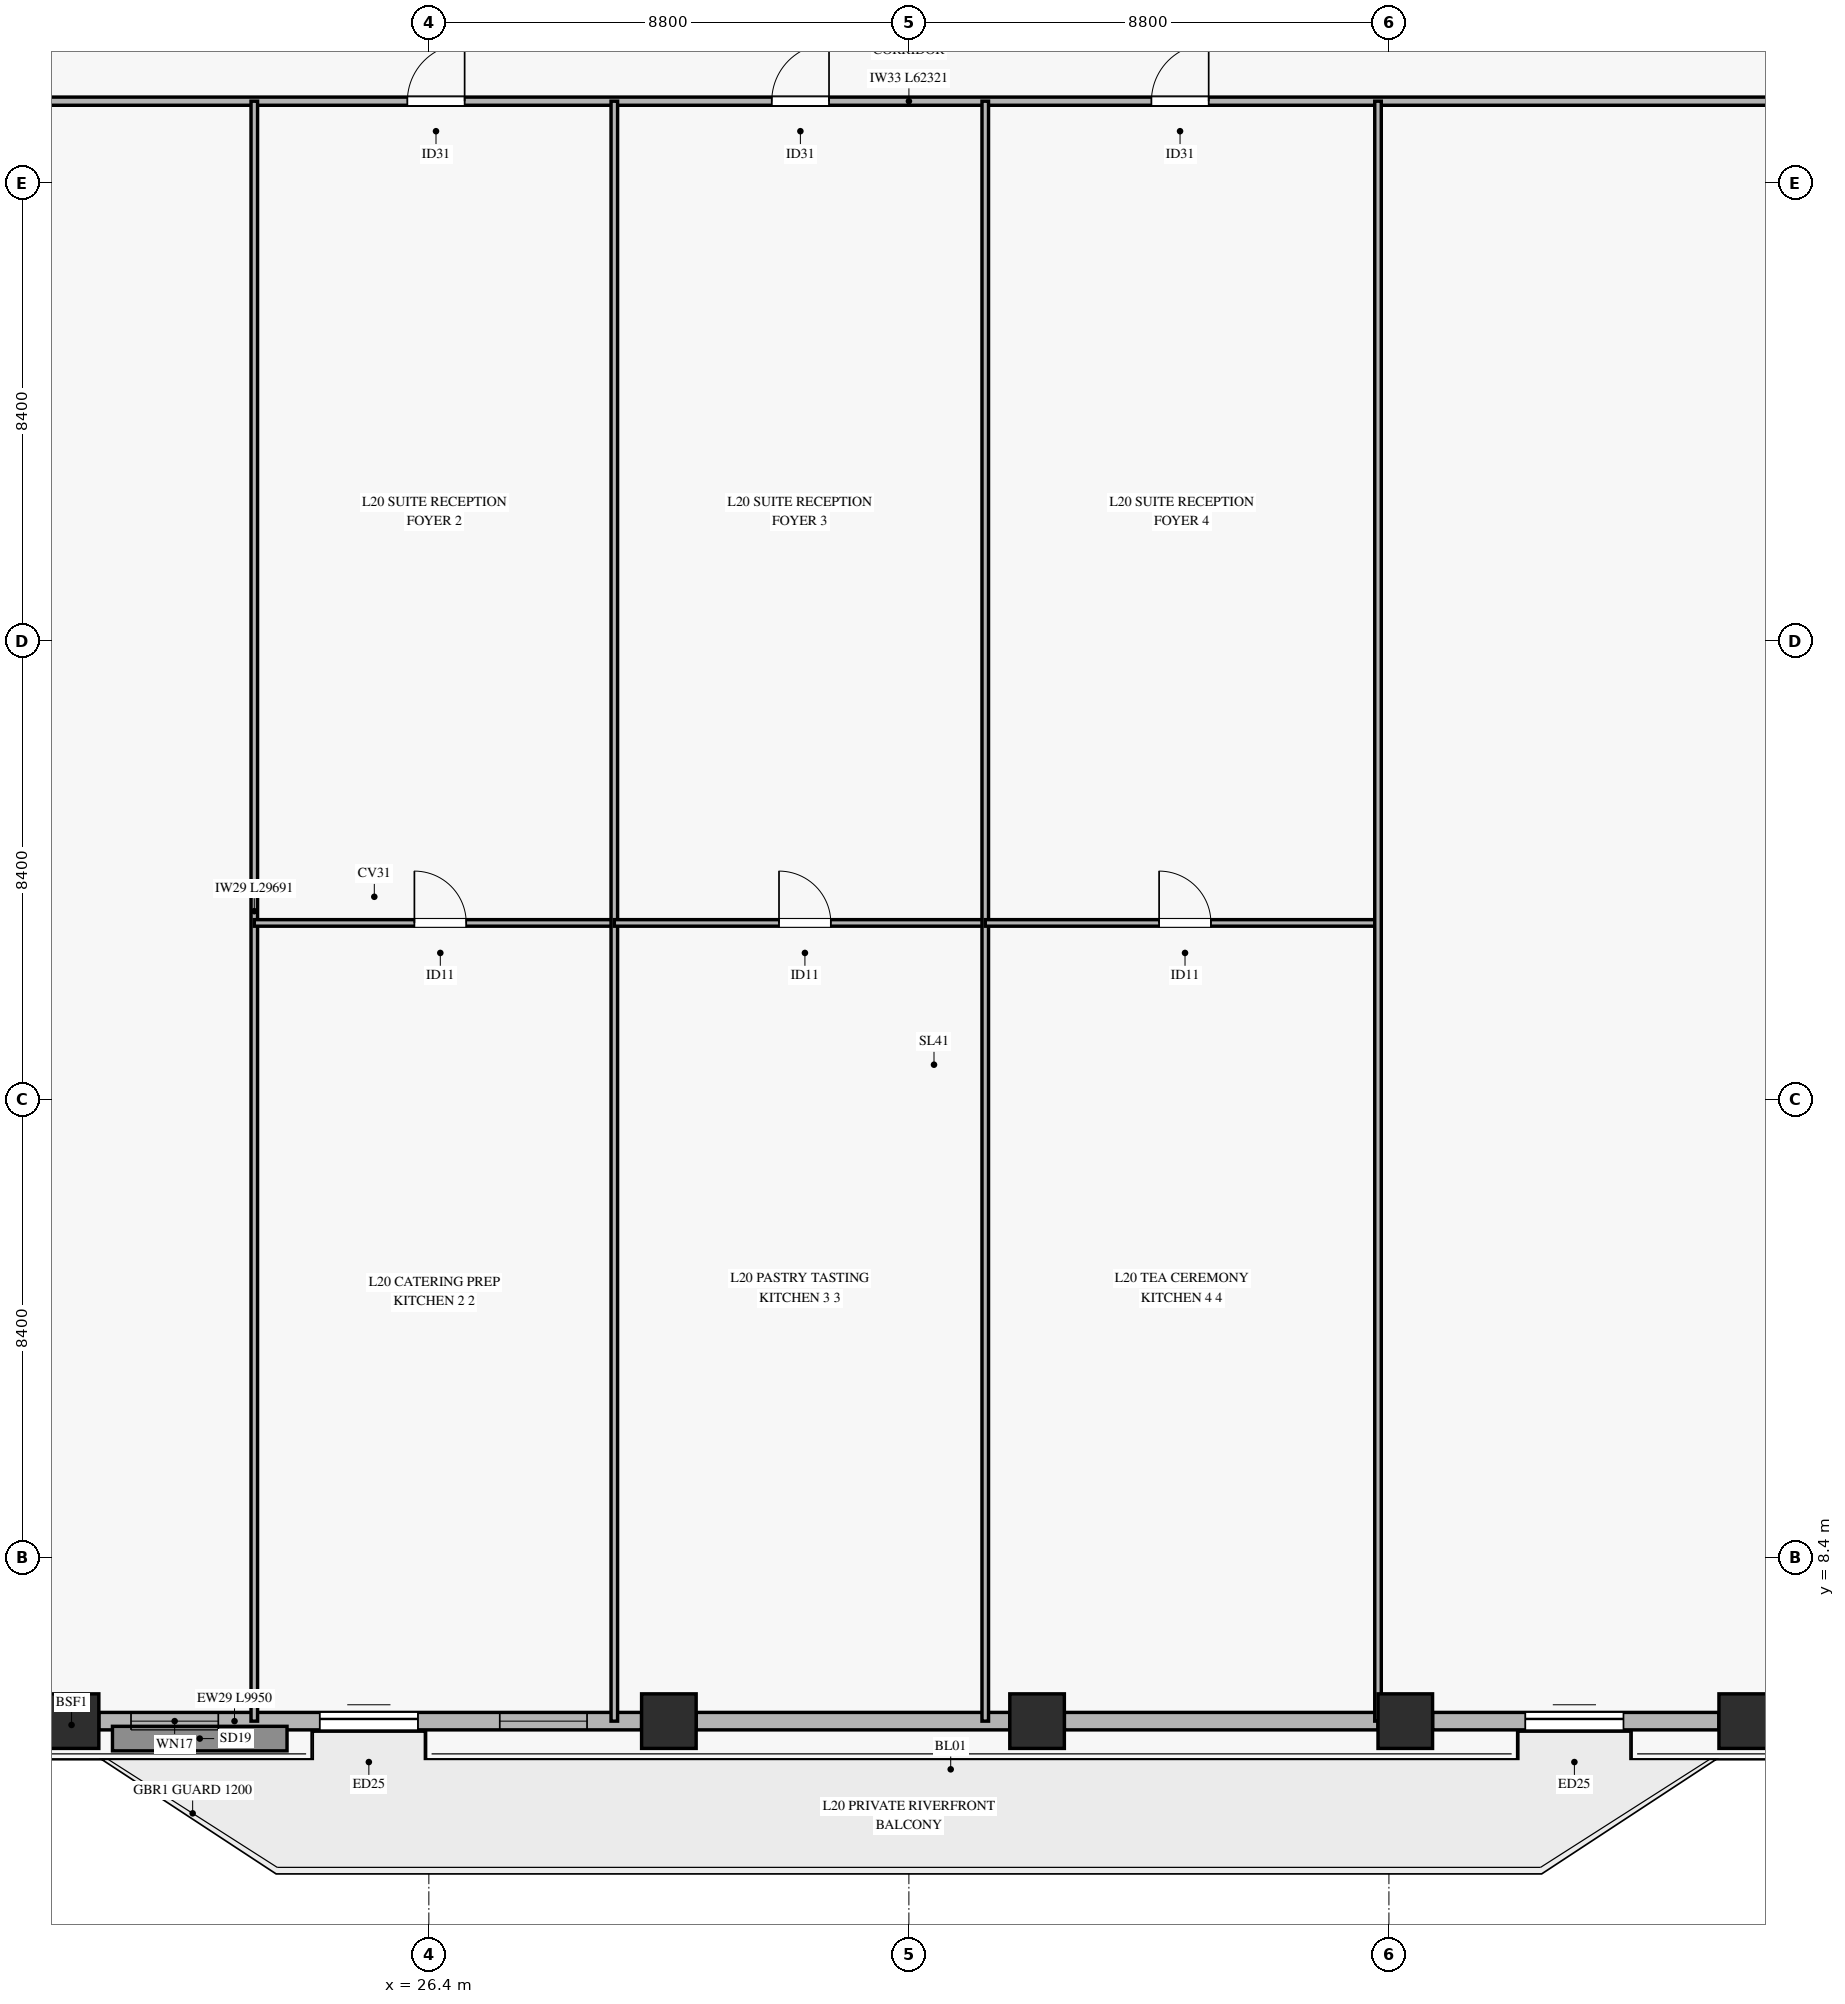
"""IFC4 building model, lengths in metres.
Left out: names, types, materials, properties, quantities, classifications, styles, units other than length and angle.
Written with IfcOpenShell. Run it as: python <this file> out.ifc"""

import sys

from ifc_helpers import new_model, si_unit, direction, frame, frame_2d, origin, origin_2d, place, context, subcontext, project, spatial, rectangle, hollow_rectangle, extrude, source, transform, mapped, element, fill, save


model = new_model("IFC4")
c1 = context("Model", 3, precision=1e-05, world=origin(), true_north=direction((0.0, 1.0)))
c2 = subcontext(c1, "Body", "Model", "MODEL_VIEW")
j1 = project(units=[si_unit("LENGTHUNIT", "METRE"), si_unit("PLANEANGLEUNIT", "RADIAN")], contexts=[c1])
p1 = place(None, origin())
s1 = spatial("IfcSite", under=j1, at=p1, CompositionType="ELEMENT")
p2 = place(p1, origin())
s2 = spatial("IfcBuilding", under=s1, at=p2, CompositionType="ELEMENT")
p3 = place(p2, frame((0.0, 0.0, 83.5)))
s3 = spatial("IfcBuildingStorey", under=s2, at=p3, CompositionType="ELEMENT", Elevation=83.5)
m1 = source(origin(), c2, "Body", "SweptSolid", [
    extrude(hollow_rectangle(XDim=1.0, YDim=1.0, WallThickness=0.045, at=origin_2d()), origin(), (0.0, 0.0, 1.0), 3.718),
])
for number, where, z_axis, x_axis in (
    (1, (19.85, 5.409, 0.0), (0.0, 0.142, 0.99), (-1.0, 0.0, 0.0)),
    (2, (30.8, 5.409, 0.0), (0.0, 0.142, 0.99), (-1.0, 0.0, 0.0)),
    (3, (37.55, 5.409, 0.0), (0.0, 0.142, 0.99), (-1.0, 0.0, 0.0)),
    (4, (44.3, 5.409, 0.0), (0.0, 0.142, 0.99), (-1.0, 0.0, 0.0)),
    (5, (50.55, 5.409, 0.0), (0.0, 0.142, 0.99), (-1.0, 0.0, 0.0)),
):
    element("IfcColumn", number, at=place(p3, frame(where, z_axis=z_axis, x_axis=x_axis)), inside=s3, PredefinedType="COLUMN", context=c2, shape_type="MappedRepresentation", body=[
        mapped(m1, transform((0.0, 0.0, 0.0), x_axis=(1.0, 0.0, 0.0), y_axis=(0.0, 1.0, 0.0), z_axis=(0.0, 0.0, 1.0), scale=1.0)),
    ])
p4 = place(p3, frame((20.35, 5.409, 0.0), z_axis=(0.0, 0.0, 1.0), x_axis=(1.0, 0.0, 0.0)))
e6 = element("IfcWall", 6, at=p4, inside=s3, PredefinedType="SOLIDWALL", context=c2, shape_type="SweptSolid", body=[
    extrude(rectangle(XDim=9.95, YDim=0.32, at=frame_2d((4.975, 0.0))), origin(), (0.0, 0.0, 1.0), 3.16),
])
p5 = place(p4, frame((4.05, 0.0, 0.0)))
e7 = element("IfcOpeningElement", 7, at=p5, cuts=e6, PredefinedType="OPENING", context=c2, shape_type="SweptSolid", body=[
    extrude(rectangle(XDim=1.8, YDim=2.25, at=frame_2d((0.9, 1.125))), frame((0.0, 0.17, 0.0), z_axis=(0.0, -1.0, 0.0), x_axis=(1.0, 0.0, 0.0)), (0.0, 0.0, 1.0), 0.34),
])
p6 = place(p4, frame((0.59, 0.0, 0.45)))
e8 = element("IfcOpeningElement", 8, at=p6, cuts=e6, PredefinedType="OPENING", context=c2, shape_type="SweptSolid", body=[
    extrude(rectangle(XDim=1.6, YDim=2.0, at=frame_2d((0.8, 1.0))), frame((0.0, 0.17, 0.0), z_axis=(0.0, -1.0, 0.0), x_axis=(1.0, 0.0, 0.0)), (0.0, 0.0, 1.0), 0.34),
])
p7 = place(p4, frame((7.35, 0.0, 0.45)))
e9 = element("IfcOpeningElement", 9, at=p7, cuts=e6, PredefinedType="OPENING", context=c2, shape_type="SweptSolid", body=[
    extrude(rectangle(XDim=1.6, YDim=2.0, at=frame_2d((0.8, 1.0))), frame((0.0, 0.17, 0.0), z_axis=(0.0, -1.0, 0.0), x_axis=(1.0, 0.0, 0.0)), (0.0, 0.0, 1.0), 0.34),
])
for number, where, z_axis, x_axis in (
    (10, (31.3, 5.409, 0.0), (0.0, 0.0, 1.0), (1.0, 0.0, 0.0)),
    (11, (38.05, 5.409, 0.0), (0.0, 0.0, 1.0), (1.0, 0.0, 0.0)),
):
    element("IfcWall", number, at=place(p3, frame(where, z_axis=z_axis, x_axis=x_axis)), inside=s3, PredefinedType="SOLIDWALL", context=c2, shape_type="SweptSolid", body=[
        extrude(rectangle(XDim=5.75, YDim=0.32, at=frame_2d((2.875, 0.0))), origin(), (0.0, 0.0, 1.0), 3.16),
    ])
p8 = place(p3, frame((44.8, 5.409, 0.0), z_axis=(0.0, 0.0, 1.0), x_axis=(1.0, 0.0, 0.0)))
e12 = element("IfcWall", 12, at=p8, inside=s3, PredefinedType="SOLIDWALL", context=c2, shape_type="SweptSolid", body=[
    extrude(rectangle(XDim=5.25, YDim=0.32, at=frame_2d((2.625, 0.0))), origin(), (0.0, 0.0, 1.0), 3.16),
])
p9 = place(p8, frame((1.7, 0.0, 0.0)))
e13 = element("IfcOpeningElement", 13, at=p9, cuts=e12, PredefinedType="OPENING", context=c2, shape_type="SweptSolid", body=[
    extrude(rectangle(XDim=1.8, YDim=2.25, at=frame_2d((0.9, 1.125))), frame((0.0, 0.17, 0.0), z_axis=(0.0, -1.0, 0.0), x_axis=(1.0, 0.0, 0.0)), (0.0, 0.0, 1.0), 0.34),
])
p10 = place(p3, frame((4.04, 35.1, 0.0), z_axis=(0.0, 0.0, 1.0), x_axis=(1.0, 0.0, 0.0)))
e14 = element("IfcWall", 14, at=p10, inside=s3, PredefinedType="PARTITIONING", context=c2, shape_type="SweptSolid", body=[
    extrude(rectangle(XDim=62.321, YDim=0.15, at=frame_2d((31.161, 0.0))), origin(), (0.0, 0.0, 1.0), 2.765),
])
p11 = place(p10, frame((8.462, 0.0, 0.0)))
e15 = element("IfcOpeningElement", 15, at=p11, cuts=e14, PredefinedType="OPENING", context=c2, shape_type="SweptSolid", body=[
    extrude(rectangle(XDim=1.05, YDim=2.15, at=frame_2d((0.525, 1.075))), frame((0.0, 0.085, 0.0), z_axis=(0.0, -1.0, 0.0), x_axis=(1.0, 0.0, 0.0)), (0.0, 0.0, 1.0), 0.17),
])
p12 = place(p10, frame((21.966, 0.0, 0.0)))
e16 = element("IfcOpeningElement", 16, at=p12, cuts=e14, PredefinedType="OPENING", context=c2, shape_type="SweptSolid", body=[
    extrude(rectangle(XDim=1.05, YDim=2.15, at=frame_2d((0.525, 1.075))), frame((0.0, 0.085, 0.0), z_axis=(0.0, -1.0, 0.0), x_axis=(1.0, 0.0, 0.0)), (0.0, 0.0, 1.0), 0.17),
])
p13 = place(p10, frame((28.646, 0.0, 0.0)))
e17 = element("IfcOpeningElement", 17, at=p13, cuts=e14, PredefinedType="OPENING", context=c2, shape_type="SweptSolid", body=[
    extrude(rectangle(XDim=1.05, YDim=2.15, at=frame_2d((0.525, 1.075))), frame((0.0, 0.085, 0.0), z_axis=(0.0, -1.0, 0.0), x_axis=(1.0, 0.0, 0.0)), (0.0, 0.0, 1.0), 0.17),
])
p14 = place(p10, frame((35.606, 0.0, 0.0)))
e18 = element("IfcOpeningElement", 18, at=p14, cuts=e14, PredefinedType="OPENING", context=c2, shape_type="SweptSolid", body=[
    extrude(rectangle(XDim=1.05, YDim=2.15, at=frame_2d((0.525, 1.075))), frame((0.0, 0.085, 0.0), z_axis=(0.0, -1.0, 0.0), x_axis=(1.0, 0.0, 0.0)), (0.0, 0.0, 1.0), 0.17),
])
p15 = place(p10, frame((49.216, 0.0, 0.0)))
e19 = element("IfcOpeningElement", 19, at=p15, cuts=e14, PredefinedType="OPENING", context=c2, shape_type="SweptSolid", body=[
    extrude(rectangle(XDim=1.05, YDim=2.15, at=frame_2d((0.525, 1.075))), frame((0.0, 0.085, 0.0), z_axis=(0.0, -1.0, 0.0), x_axis=(1.0, 0.0, 0.0)), (0.0, 0.0, 1.0), 0.17),
])
p16 = place(p3, frame((23.2, 5.409, 0.0), z_axis=(0.0, 0.0, 1.0), x_axis=(0.0, 1.0, 0.0)))
e20 = element("IfcWall", 20, at=p16, inside=s3, PredefinedType="PARTITIONING", context=c2, shape_type="SweptSolid", body=[
    extrude(rectangle(XDim=29.691, YDim=0.12, at=frame_2d((14.846, 0.0))), origin(), (0.0, 0.0, 1.0), 3.165),
])
p17 = place(p3, frame((23.2, 20.039, 0.0), z_axis=(0.0, 0.0, 1.0), x_axis=(1.0, 0.0, 0.0)))
e21 = element("IfcWall", 21, at=p17, inside=s3, PredefinedType="PARTITIONING", context=c2, shape_type="SweptSolid", body=[
    extrude(rectangle(XDim=6.6, YDim=0.12, at=frame_2d((3.3, 0.0))), origin(), (0.0, 0.0, 1.0), 3.68),
])
p18 = place(p17, frame((2.935, 0.0, 0.0)))
e22 = element("IfcOpeningElement", 22, at=p18, cuts=e21, PredefinedType="OPENING", context=c2, shape_type="SweptSolid", body=[
    extrude(rectangle(XDim=0.95, YDim=2.1, at=frame_2d((0.475, 1.05))), frame((0.0, 0.07, 0.0), z_axis=(0.0, -1.0, 0.0), x_axis=(1.0, 0.0, 0.0)), (0.0, 0.0, 1.0), 0.14),
])
p19 = place(p3, frame((29.8, 5.409, 0.0), z_axis=(0.0, 0.0, 1.0), x_axis=(0.0, 1.0, 0.0)))
e23 = element("IfcWall", 23, at=p19, inside=s3, PredefinedType="PARTITIONING", context=c2, shape_type="SweptSolid", body=[
    extrude(rectangle(XDim=29.691, YDim=0.12, at=frame_2d((14.846, 0.0))), origin(), (0.0, 0.0, 1.0), 3.165),
])
p20 = place(p3, frame((29.8, 20.039, 0.0), z_axis=(0.0, 0.0, 1.0), x_axis=(1.0, 0.0, 0.0)))
e24 = element("IfcWall", 24, at=p20, inside=s3, PredefinedType="PARTITIONING", context=c2, shape_type="SweptSolid", body=[
    extrude(rectangle(XDim=6.8, YDim=0.12, at=frame_2d((3.4, 0.0))), origin(), (0.0, 0.0, 1.0), 2.765),
])
p21 = place(p20, frame((3.019, 0.0, 0.0)))
e25 = element("IfcOpeningElement", 25, at=p21, cuts=e24, PredefinedType="OPENING", context=c2, shape_type="SweptSolid", body=[
    extrude(rectangle(XDim=0.95, YDim=2.1, at=frame_2d((0.475, 1.05))), frame((0.0, 0.07, 0.0), z_axis=(0.0, -1.0, 0.0), x_axis=(1.0, 0.0, 0.0)), (0.0, 0.0, 1.0), 0.14),
])
p22 = place(p3, frame((36.6, 5.409, 0.0), z_axis=(0.0, 0.0, 1.0), x_axis=(0.0, 1.0, 0.0)))
e26 = element("IfcWall", 26, at=p22, inside=s3, PredefinedType="PARTITIONING", context=c2, shape_type="SweptSolid", body=[
    extrude(rectangle(XDim=29.691, YDim=0.12, at=frame_2d((14.846, 0.0))), origin(), (0.0, 0.0, 1.0), 3.165),
])
p23 = place(p3, frame((36.6, 20.039, 0.0), z_axis=(0.0, 0.0, 1.0), x_axis=(1.0, 0.0, 0.0)))
e27 = element("IfcWall", 27, at=p23, inside=s3, PredefinedType="PARTITIONING", context=c2, shape_type="SweptSolid", body=[
    extrude(rectangle(XDim=7.2, YDim=0.12, at=frame_2d((3.6, 0.0))), origin(), (0.0, 0.0, 1.0), 2.765),
])
p24 = place(p23, frame((3.187, 0.0, 0.0)))
e28 = element("IfcOpeningElement", 28, at=p24, cuts=e27, PredefinedType="OPENING", context=c2, shape_type="SweptSolid", body=[
    extrude(rectangle(XDim=0.95, YDim=2.1, at=frame_2d((0.475, 1.05))), frame((0.0, 0.07, 0.0), z_axis=(0.0, -1.0, 0.0), x_axis=(1.0, 0.0, 0.0)), (0.0, 0.0, 1.0), 0.14),
])
p25 = place(p3, frame((43.8, 5.409, 0.0), z_axis=(0.0, 0.0, 1.0), x_axis=(0.0, 1.0, 0.0)))
e29 = element("IfcWall", 29, at=p25, inside=s3, PredefinedType="PARTITIONING", context=c2, shape_type="SweptSolid", body=[
    extrude(rectangle(XDim=29.691, YDim=0.12, at=frame_2d((14.846, 0.0))), origin(), (0.0, 0.0, 1.0), 3.165),
])
m2 = source(origin(), c2, "Body", "SweptSolid", [
    extrude(rectangle(XDim=1.8, YDim=2.25, at=frame_2d((0.9, 1.125))), frame((0.0, 0.025, 0.0), z_axis=(0.0, -1.0, 0.0), x_axis=(1.0, 0.0, 0.0)), (0.0, 0.0, 1.0), 0.05),
])
p26 = place(p5, origin())
e30 = element("IfcDoor", 30, at=p26, inside=s3, OperationType="SLIDING_TO_LEFT", PredefinedType="DOOR", context=c2, shape_type="MappedRepresentation", body=[
    mapped(m2, transform((0.0, 0.0, 0.0), x_axis=(1.0, 0.0, 0.0), y_axis=(0.0, 1.0, 0.0), z_axis=(0.0, 0.0, 1.0), scale=1.0)),
])
fill(e7, e30)
m3 = source(origin(), c2, "Body", "SweptSolid", [
    extrude(rectangle(XDim=1.6, YDim=2.0, at=frame_2d((0.8, 1.0))), frame((0.0, 0.03, 0.0), z_axis=(0.0, -1.0, 0.0), x_axis=(1.0, 0.0, 0.0)), (0.0, 0.0, 1.0), 0.06),
])
p27 = place(p6, origin())
e31 = element("IfcWindow", 31, at=p27, inside=s3, PartitioningType="SINGLE_PANEL", PredefinedType="WINDOW", context=c2, shape_type="MappedRepresentation", body=[
    mapped(m3, transform((0.0, 0.0, 0.0), x_axis=(1.0, 0.0, 0.0), y_axis=(0.0, 1.0, 0.0), z_axis=(0.0, 0.0, 1.0), scale=1.0)),
])
fill(e8, e31)
p28 = place(p7, origin())
e32 = element("IfcWindow", 32, at=p28, inside=s3, PartitioningType="SINGLE_PANEL", PredefinedType="WINDOW", context=c2, shape_type="MappedRepresentation", body=[
    mapped(m3, transform((0.0, 0.0, 0.0), x_axis=(1.0, 0.0, 0.0), y_axis=(0.0, 1.0, 0.0), z_axis=(0.0, 0.0, 1.0), scale=1.0)),
])
fill(e9, e32)
p29 = place(p9, origin())
e33 = element("IfcDoor", 33, at=p29, inside=s3, OperationType="SLIDING_TO_LEFT", PredefinedType="DOOR", context=c2, shape_type="MappedRepresentation", body=[
    mapped(m2, transform((0.0, 0.0, 0.0), x_axis=(1.0, 0.0, 0.0), y_axis=(0.0, 1.0, 0.0), z_axis=(0.0, 0.0, 1.0), scale=1.0)),
])
fill(e13, e33)
m4 = source(origin(), c2, "Body", "SweptSolid", [
    extrude(rectangle(XDim=1.05, YDim=2.15, at=frame_2d((0.525, 1.075))), frame((0.0, 0.025, 0.0), z_axis=(0.0, -1.0, 0.0), x_axis=(1.0, 0.0, 0.0)), (0.0, 0.0, 1.0), 0.05),
])
p30 = place(p12, origin())
e34 = element("IfcDoor", 34, at=p30, inside=s3, OperationType="SINGLE_SWING_RIGHT", PredefinedType="DOOR", context=c2, shape_type="MappedRepresentation", body=[
    mapped(m4, transform((0.0, 0.0, 0.0), x_axis=(1.0, 0.0, 0.0), y_axis=(0.0, 1.0, 0.0), z_axis=(0.0, 0.0, 1.0), scale=1.0)),
])
fill(e16, e34)
m5 = source(origin(), c2, "Body", "SweptSolid", [
    extrude(rectangle(XDim=0.95, YDim=2.1, at=frame_2d((0.475, 1.05))), frame((0.0, 0.025, 0.0), z_axis=(0.0, -1.0, 0.0), x_axis=(1.0, 0.0, 0.0)), (0.0, 0.0, 1.0), 0.05),
])
p31 = place(p18, origin())
e35 = element("IfcDoor", 35, at=p31, inside=s3, OperationType="SINGLE_SWING_LEFT", PredefinedType="DOOR", context=c2, shape_type="MappedRepresentation", body=[
    mapped(m5, transform((0.0, 0.0, 0.0), x_axis=(1.0, 0.0, 0.0), y_axis=(0.0, 1.0, 0.0), z_axis=(0.0, 0.0, 1.0), scale=1.0)),
])
fill(e22, e35)
p32 = place(p13, origin())
e36 = element("IfcDoor", 36, at=p32, inside=s3, OperationType="SINGLE_SWING_RIGHT", PredefinedType="DOOR", context=c2, shape_type="MappedRepresentation", body=[
    mapped(m4, transform((0.0, 0.0, 0.0), x_axis=(1.0, 0.0, 0.0), y_axis=(0.0, 1.0, 0.0), z_axis=(0.0, 0.0, 1.0), scale=1.0)),
])
fill(e17, e36)
p33 = place(p21, origin())
e37 = element("IfcDoor", 37, at=p33, inside=s3, OperationType="SINGLE_SWING_LEFT", PredefinedType="DOOR", context=c2, shape_type="MappedRepresentation", body=[
    mapped(m5, transform((0.0, 0.0, 0.0), x_axis=(1.0, 0.0, 0.0), y_axis=(0.0, 1.0, 0.0), z_axis=(0.0, 0.0, 1.0), scale=1.0)),
])
fill(e25, e37)
p34 = place(p14, origin())
e38 = element("IfcDoor", 38, at=p34, inside=s3, OperationType="SINGLE_SWING_RIGHT", PredefinedType="DOOR", context=c2, shape_type="MappedRepresentation", body=[
    mapped(m4, transform((0.0, 0.0, 0.0), x_axis=(1.0, 0.0, 0.0), y_axis=(0.0, 1.0, 0.0), z_axis=(0.0, 0.0, 1.0), scale=1.0)),
])
fill(e18, e38)
p35 = place(p24, origin())
e39 = element("IfcDoor", 39, at=p35, inside=s3, OperationType="SINGLE_SWING_LEFT", PredefinedType="DOOR", context=c2, shape_type="MappedRepresentation", body=[
    mapped(m5, transform((0.0, 0.0, 0.0), x_axis=(1.0, 0.0, 0.0), y_axis=(0.0, 1.0, 0.0), z_axis=(0.0, 0.0, 1.0), scale=1.0)),
])
fill(e28, e39)
save(model, sys.argv[1])
